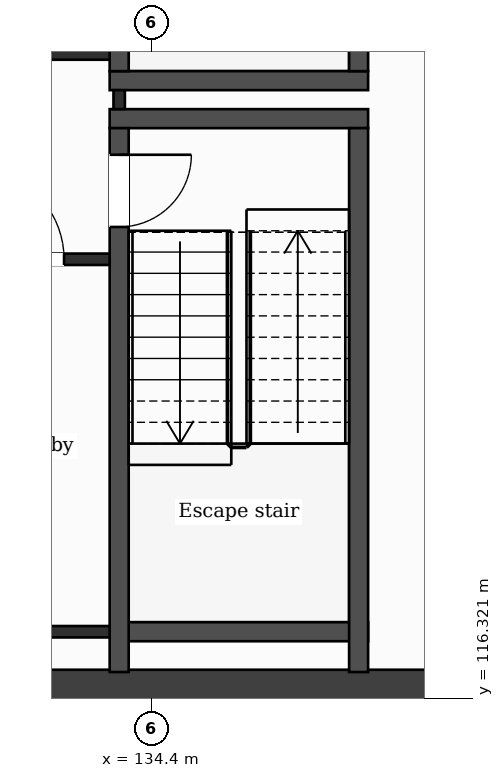
"""IFC4 building model, lengths in metres.
Left out: names, types, materials, properties, quantities, classifications, styles, units other than length and angle.
Written with IfcOpenShell. Run it as: python <this file> out.ifc"""

import sys

from ifc_helpers import new_model, si_unit, direction, frame, frame_2d, origin, place, context, subcontext, project, spatial, rectangle, extrude, element, fill, save


model = new_model("IFC4")
c1 = context("Model", 3, precision=1e-05, world=origin(), true_north=direction((0.0, 1.0)))
c2 = subcontext(c1, "Body", "Model", "MODEL_VIEW")
j1 = project(units=[si_unit("LENGTHUNIT", "METRE"), si_unit("PLANEANGLEUNIT", "RADIAN")], contexts=[c1])
p1 = place(None, origin())
s1 = spatial("IfcSite", under=j1, at=p1, CompositionType="ELEMENT")
p2 = place(p1, origin())
s2 = spatial("IfcBuilding", under=s1, at=p2, CompositionType="ELEMENT")
p3 = place(p2, frame((0.0, 0.0, 296.0)))
s3 = spatial("IfcBuildingStorey", under=s2, at=p3, CompositionType="ELEMENT", Elevation=296.0)
p4 = place(p3, frame((137.863, 132.05, 0.0), z_axis=(0.0, 0.0, 1.0), x_axis=(0.133401241494, -0.991062111458, 0.0)))
e1 = element("IfcWall", 1, at=p4, inside=s3, PredefinedType="SHEAR", context=c2, shape_type="SweptSolid", body=[
    extrude(rectangle(XDim=15.842, YDim=0.7, at=frame_2d((7.921, 0.0))), origin(), (0.0, 0.0, 1.0), 3.7),
])
p5 = place(p3, frame((139.977, 116.35, 0.0), z_axis=(0.0, 0.0, 1.0), x_axis=(-1.0, 0.0, 0.0)))
e2 = element("IfcWall", 2, at=p5, inside=s3, PredefinedType="SHEAR", context=c2, shape_type="SweptSolid", body=[
    extrude(rectangle(XDim=13.626, YDim=0.7, at=frame_2d((6.813, 0.0))), origin(), (0.0, 0.0, 1.0), 3.7),
])
p6 = place(p3, frame((131.573, 117.2, 0.0), z_axis=(0.0, 0.0, 1.0), x_axis=(1.0, 0.0, 0.0)))
e3 = element("IfcWall", 3, at=p6, inside=s3, PredefinedType="PARTITIONING", context=c2, shape_type="SweptSolid", body=[
    extrude(rectangle(XDim=2.4, YDim=0.15, at=frame_2d((1.2, 0.0))), origin(), (0.0, 0.0, 1.0), 3.38),
])
p7 = place(p3, frame((133.973, 117.2, 0.0), z_axis=(0.0, 0.0, 1.0), x_axis=(1.0, 0.0, 0.0)))
e4 = element("IfcWall", 4, at=p7, inside=s3, PredefinedType="PARTITIONING", context=c2, shape_type="SweptSolid", body=[
    extrude(rectangle(XDim=3.275, YDim=0.25, at=frame_2d((1.638, 0.0))), origin(), (0.0, 0.0, 1.0), 3.38),
])
p8 = place(p3, frame((131.573, 122.1, 0.0), z_axis=(0.0, 0.0, 1.0), x_axis=(1.0, 0.0, 0.0)))
e5 = element("IfcWall", 5, at=p8, inside=s3, PredefinedType="PARTITIONING", context=c2, shape_type="SweptSolid", body=[
    extrude(rectangle(XDim=2.4, YDim=0.15, at=frame_2d((1.2, 0.0))), origin(), (0.0, 0.0, 1.0), 3.38),
])
p9 = place(p8, frame((0.475, 0.0, 0.0)))
e6 = element("IfcOpeningElement", 6, at=p9, cuts=e5, PredefinedType="OPENING", context=c2, shape_type="SweptSolid", body=[
    extrude(rectangle(XDim=1.2, YDim=2.1, at=frame_2d((0.6, 1.05))), frame((0.0, 0.085, 0.0), z_axis=(0.0, -1.0, 0.0), x_axis=(1.0, 0.0, 0.0)), (0.0, 0.0, 1.0), 0.17),
])
for number, where, z_axis, x_axis in (
    (7, (133.848, 123.95, 0.0), (0.0, 0.0, 1.0), (1.0, 0.0, 0.0)),
    (8, (133.848, 124.45, 0.0), (0.0, 0.0, 1.0), (1.0, 0.0, 0.0)),
):
    element("IfcWall", number, at=place(p3, frame(where, z_axis=z_axis, x_axis=x_axis)), inside=s3, PredefinedType="PARTITIONING", context=c2, shape_type="SweptSolid", body=[
        extrude(rectangle(XDim=3.4, YDim=0.25, at=frame_2d((1.7, 0.0))), origin(), (0.0, 0.0, 1.0), 3.38),
    ])
p10 = place(p3, frame((131.549, 124.8, 0.0), z_axis=(0.0, 0.0, 1.0), x_axis=(1.0, 0.0, 0.0)))
e9 = element("IfcWall", 9, at=p10, inside=s3, PredefinedType="PARTITIONING", context=c2, shape_type="SweptSolid", body=[
    extrude(rectangle(XDim=2.549, YDim=0.15, at=frame_2d((1.275, 0.0))), origin(), (0.0, 0.0, 1.0), 3.38),
])
p11 = place(p3, frame((133.973, 124.075, 0.0), z_axis=(0.0, 0.0, 1.0), x_axis=(0.0, 1.0, 0.0)))
e10 = element("IfcWall", 10, at=p11, inside=s3, PredefinedType="PARTITIONING", context=c2, shape_type="SweptSolid", body=[
    extrude(rectangle(XDim=0.25, YDim=0.15, at=frame_2d((0.125, 0.0))), origin(), (0.0, 0.0, 1.0), 3.38),
])
p12 = place(p3, frame((133.973, 116.67, 0.0), z_axis=(0.0, 0.0, 1.0), x_axis=(0.0, 1.0, 0.0)))
e11 = element("IfcWall", 11, at=p12, inside=s3, PredefinedType="PARTITIONING", context=c2, shape_type="SweptSolid", body=[
    extrude(rectangle(XDim=7.155, YDim=0.25, at=frame_2d((3.578, 0.0))), origin(), (0.0, 0.0, 1.0), 3.38),
])
p13 = place(p12, frame((5.855, 0.0, 0.0)))
e12 = element("IfcOpeningElement", 12, at=p13, cuts=e11, PredefinedType="OPENING", context=c2, shape_type="SweptSolid", body=[
    extrude(rectangle(XDim=0.95, YDim=2.1, at=frame_2d((0.475, 1.05))), frame((0.0, 0.135, 0.0), z_axis=(0.0, -1.0, 0.0), x_axis=(1.0, 0.0, 0.0)), (0.0, 0.0, 1.0), 0.27),
])
p14 = place(p3, frame((133.973, 124.575, 0.0), z_axis=(0.0, 0.0, 1.0), x_axis=(0.0, 1.0, 0.0)))
e13 = element("IfcWall", 13, at=p14, inside=s3, PredefinedType="PARTITIONING", context=c2, shape_type="SweptSolid", body=[
    extrude(rectangle(XDim=7.155, YDim=0.25, at=frame_2d((3.578, 0.0))), origin(), (0.0, 0.0, 1.0), 3.38),
])
p15 = place(p14, frame((5.325, 0.0, 0.0)))
e14 = element("IfcOpeningElement", 14, at=p15, cuts=e13, PredefinedType="OPENING", context=c2, shape_type="SweptSolid", body=[
    extrude(rectangle(XDim=1.0, YDim=2.1, at=frame_2d((0.5, 1.05))), frame((0.0, 0.135, 0.0), z_axis=(0.0, -1.0, 0.0), x_axis=(1.0, 0.0, 0.0)), (0.0, 0.0, 1.0), 0.27),
])
for number, where, z_axis, x_axis in (
    (15, (137.123, 116.67, 0.0), (0.0, 0.0, 1.0), (0.0, 1.0, 0.0)),
    (16, (137.123, 124.575, 0.0), (0.0, 0.0, 1.0), (0.0, 1.0, 0.0)),
):
    element("IfcWall", number, at=place(p3, frame(where, z_axis=z_axis, x_axis=x_axis)), inside=s3, PredefinedType="PARTITIONING", context=c2, shape_type="SweptSolid", body=[
        extrude(rectangle(XDim=7.155, YDim=0.25, at=frame_2d((3.578, 0.0))), origin(), (0.0, 0.0, 1.0), 3.38),
    ])
p16 = place(p9, origin())
e17 = element("IfcDoor", 17, at=p16, inside=s3, OperationType="SINGLE_SWING_LEFT", PredefinedType="DOOR", context=c2, shape_type="SweptSolid", body=[
    extrude(rectangle(XDim=1.2, YDim=2.1, at=frame_2d((0.6, 1.05))), frame((0.0, 0.025, 0.0), z_axis=(0.0, -1.0, 0.0), x_axis=(1.0, 0.0, 0.0)), (0.0, 0.0, 1.0), 0.05),
])
fill(e6, e17)
p17 = place(p13, origin())
e18 = element("IfcDoor", 18, at=p17, inside=s3, OperationType="SINGLE_SWING_RIGHT", PredefinedType="DOOR", context=c2, shape_type="SweptSolid", body=[
    extrude(rectangle(XDim=0.95, YDim=2.1, at=frame_2d((0.475, 1.05))), frame((0.0, 0.025, 0.0), z_axis=(0.0, -1.0, 0.0), x_axis=(1.0, 0.0, 0.0)), (0.0, 0.0, 1.0), 0.05),
])
fill(e12, e18)
save(model, sys.argv[1])
